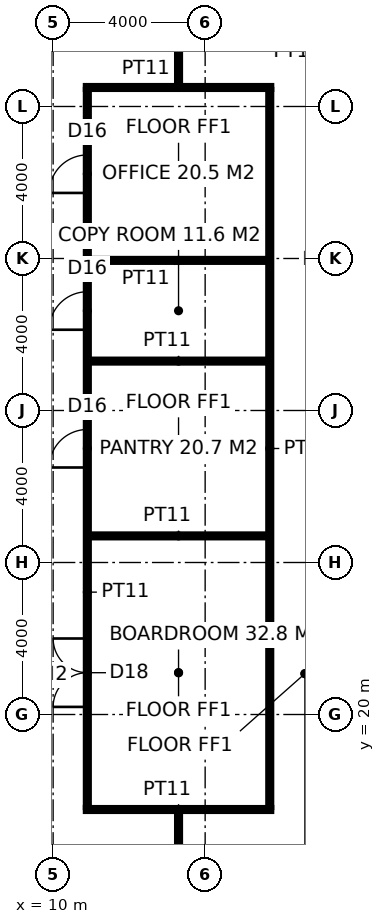
"""IFC4 building model, lengths in metres.
Left out: names, types, materials, properties, quantities, classifications, styles, units other than length and angle.
Written with IfcOpenShell. Run it as: python <this file> out.ifc"""

import sys

from ifc_helpers import new_model, si_unit, direction, frame, frame_2d, origin, place, context, subcontext, project, spatial, rectangle, extrude, element, fill, save


model = new_model("IFC4")
c1 = context("Model", 3, precision=1e-05, world=origin(), true_north=direction((0.0, 1.0)))
c2 = subcontext(c1, "Body", "Model", "MODEL_VIEW")
j1 = project(units=[si_unit("LENGTHUNIT", "METRE"), si_unit("PLANEANGLEUNIT", "RADIAN")], contexts=[c1])
p1 = place(None, origin())
s1 = spatial("IfcSite", under=j1, at=p1, CompositionType="ELEMENT")
p2 = place(p1, origin())
s2 = spatial("IfcBuilding", under=s1, at=p2, CompositionType="ELEMENT")
p3 = place(p2, frame((0.0, 0.0, 278.2)))
s3 = spatial("IfcBuildingStorey", under=s2, at=p3, CompositionType="ELEMENT", Elevation=278.2)
p4 = place(p3, frame((10.85, 17.5, 0.0), z_axis=(0.0, 0.0, 1.0), x_axis=(1.0, 0.0, 0.0)))
e1 = element("IfcWall", 1, at=p4, inside=s3, PredefinedType="PARTITIONING", context=c2, shape_type="SweptSolid", body=[
    extrude(rectangle(XDim=4.9, YDim=0.1, at=frame_2d((2.45, 0.0))), origin(), (0.0, 0.0, 1.0), 3.85),
])
for number, where, z_axis, x_axis in (
    (2, (10.95, 24.7, 0.0), (0.0, 0.0, 1.0), (1.0, 0.0, 0.0)),
    (3, (10.95, 29.3, 0.0), (0.0, 0.0, 1.0), (1.0, 0.0, 0.0)),
):
    element("IfcWall", number, at=place(p3, frame(where, z_axis=z_axis, x_axis=x_axis)), inside=s3, PredefinedType="PARTITIONING", context=c2, shape_type="SweptSolid", body=[
        extrude(rectangle(XDim=4.7, YDim=0.1, at=frame_2d((2.35, 0.0))), origin(), (0.0, 0.0, 1.0), 3.85),
    ])
p5 = place(p3, frame((10.95, 31.95, 0.0), z_axis=(0.0, 0.0, 1.0), x_axis=(1.0, 0.0, 0.0)))
e4 = element("IfcWall", 4, at=p5, inside=s3, PredefinedType="PARTITIONING", context=c2, shape_type="SweptSolid", body=[
    extrude(rectangle(XDim=4.7, YDim=0.1, at=frame_2d((2.35, 0.0))), origin(), (0.0, 0.0, 1.0), 2.95),
])
p6 = place(p3, frame((10.85, 36.5, 0.0), z_axis=(0.0, 0.0, 1.0), x_axis=(1.0, 0.0, 0.0)))
e5 = element("IfcWall", 5, at=p6, inside=s3, PredefinedType="PARTITIONING", context=c2, shape_type="SweptSolid", body=[
    extrude(rectangle(XDim=4.9, YDim=0.1, at=frame_2d((2.45, 0.0))), origin(), (0.0, 0.0, 1.0), 2.85),
])
p7 = place(p3, frame((10.9, 17.55, 0.0), z_axis=(0.0, 0.0, 1.0), x_axis=(0.0, 1.0, 0.0)))
e6 = element("IfcWall", 6, at=p7, inside=s3, PredefinedType="PARTITIONING", context=c2, shape_type="SweptSolid", body=[
    extrude(rectangle(XDim=18.9, YDim=0.1, at=frame_2d((9.45, 0.0))), origin(), (0.0, 0.0, 1.0), 3.85),
])
p8 = place(p7, frame((2.65, 0.0, 0.0)))
e7 = element("IfcOpeningElement", 7, at=p8, cuts=e6, PredefinedType="OPENING", context=c2, shape_type="SweptSolid", body=[
    extrude(rectangle(XDim=1.8, YDim=2.4, at=frame_2d((0.9, 1.2))), frame((0.0, 0.06, 0.0), z_axis=(0.0, -1.0, 0.0), x_axis=(1.0, 0.0, 0.0)), (0.0, 0.0, 1.0), 0.12),
])
p9 = place(p7, frame((8.95, 0.0, 0.0)))
e8 = element("IfcOpeningElement", 8, at=p9, cuts=e6, PredefinedType="OPENING", context=c2, shape_type="SweptSolid", body=[
    extrude(rectangle(XDim=1.0, YDim=2.2, at=frame_2d((0.5, 1.1))), frame((0.0, 0.06, 0.0), z_axis=(0.0, -1.0, 0.0), x_axis=(1.0, 0.0, 0.0)), (0.0, 0.0, 1.0), 0.12),
])
p10 = place(p7, frame((12.575, 0.0, 0.0)))
e9 = element("IfcOpeningElement", 9, at=p10, cuts=e6, PredefinedType="OPENING", context=c2, shape_type="SweptSolid", body=[
    extrude(rectangle(XDim=1.0, YDim=2.2, at=frame_2d((0.5, 1.1))), frame((0.0, 0.06, 0.0), z_axis=(0.0, -1.0, 0.0), x_axis=(1.0, 0.0, 0.0)), (0.0, 0.0, 1.0), 0.12),
])
p11 = place(p7, frame((16.175, 0.0, 0.0)))
e10 = element("IfcOpeningElement", 10, at=p11, cuts=e6, PredefinedType="OPENING", context=c2, shape_type="SweptSolid", body=[
    extrude(rectangle(XDim=1.0, YDim=2.2, at=frame_2d((0.5, 1.1))), frame((0.0, 0.06, 0.0), z_axis=(0.0, -1.0, 0.0), x_axis=(1.0, 0.0, 0.0)), (0.0, 0.0, 1.0), 0.12),
])
p12 = place(p3, frame((15.7, 17.55, 0.0), z_axis=(0.0, 0.0, 1.0), x_axis=(0.0, 1.0, 0.0)))
e11 = element("IfcWall", 11, at=p12, inside=s3, PredefinedType="PARTITIONING", context=c2, shape_type="SweptSolid", body=[
    extrude(rectangle(XDim=18.9, YDim=0.1, at=frame_2d((9.45, 0.0))), origin(), (0.0, 0.0, 1.0), 3.85),
])
p13 = place(p3, frame((13.3, 4.3, 0.0), z_axis=(0.0, 0.0, 1.0), x_axis=(0.0, 1.0, 0.0)))
e12 = element("IfcWall", 12, at=p13, inside=s3, PredefinedType="PARTITIONING", context=c2, shape_type="SweptSolid", body=[
    extrude(rectangle(XDim=13.15, YDim=0.1, at=frame_2d((6.575, 0.0))), origin(), (0.0, 0.0, 1.0), 3.85),
])
p14 = place(p13, frame((6.075, 0.0, 0.0)))
e13 = element("IfcOpeningElement", 13, at=p14, cuts=e12, PredefinedType="OPENING", context=c2, shape_type="SweptSolid", body=[
    extrude(rectangle(XDim=1.0, YDim=2.2, at=frame_2d((0.5, 1.1))), frame((0.0, 0.06, 0.0), z_axis=(0.0, -1.0, 0.0), x_axis=(1.0, 0.0, 0.0)), (0.0, 0.0, 1.0), 0.12),
])
p15 = place(p3, frame((13.3, 36.55, 0.0), z_axis=(0.0, 0.0, 1.0), x_axis=(0.0, 1.0, 0.0)))
e14 = element("IfcWall", 14, at=p15, inside=s3, PredefinedType="PARTITIONING", context=c2, shape_type="SweptSolid", body=[
    extrude(rectangle(XDim=7.15, YDim=0.1, at=frame_2d((3.575, 0.0))), origin(), (0.0, 0.0, 1.0), 3.85),
])
p16 = place(p8, origin())
e15 = element("IfcDoor", 15, at=p16, inside=s3, OperationType="DOUBLE_DOOR_DOUBLE_SWING", PredefinedType="DOOR", context=c2, shape_type="SweptSolid", body=[
    extrude(rectangle(XDim=1.8, YDim=2.4, at=frame_2d((0.9, 1.2))), frame((0.0, 0.025, 0.0), z_axis=(0.0, -1.0, 0.0), x_axis=(1.0, 0.0, 0.0)), (0.0, 0.0, 1.0), 0.05),
])
fill(e7, e15)
p17 = place(p9, origin())
e16 = element("IfcDoor", 16, at=p17, inside=s3, OperationType="SINGLE_SWING_LEFT", PredefinedType="DOOR", context=c2, shape_type="SweptSolid", body=[
    extrude(rectangle(XDim=1.0, YDim=2.2, at=frame_2d((0.5, 1.1))), frame((0.0, 0.025, 0.0), z_axis=(0.0, -1.0, 0.0), x_axis=(1.0, 0.0, 0.0)), (0.0, 0.0, 1.0), 0.05),
])
fill(e8, e16)
p18 = place(p10, origin())
e17 = element("IfcDoor", 17, at=p18, inside=s3, OperationType="SINGLE_SWING_LEFT", PredefinedType="DOOR", context=c2, shape_type="SweptSolid", body=[
    extrude(rectangle(XDim=1.0, YDim=2.2, at=frame_2d((0.5, 1.1))), frame((0.0, 0.025, 0.0), z_axis=(0.0, -1.0, 0.0), x_axis=(1.0, 0.0, 0.0)), (0.0, 0.0, 1.0), 0.05),
])
fill(e9, e17)
p19 = place(p11, origin())
e18 = element("IfcDoor", 18, at=p19, inside=s3, OperationType="SINGLE_SWING_LEFT", PredefinedType="DOOR", context=c2, shape_type="SweptSolid", body=[
    extrude(rectangle(XDim=1.0, YDim=2.2, at=frame_2d((0.5, 1.1))), frame((0.0, 0.025, 0.0), z_axis=(0.0, -1.0, 0.0), x_axis=(1.0, 0.0, 0.0)), (0.0, 0.0, 1.0), 0.05),
])
fill(e10, e18)
save(model, sys.argv[1])
